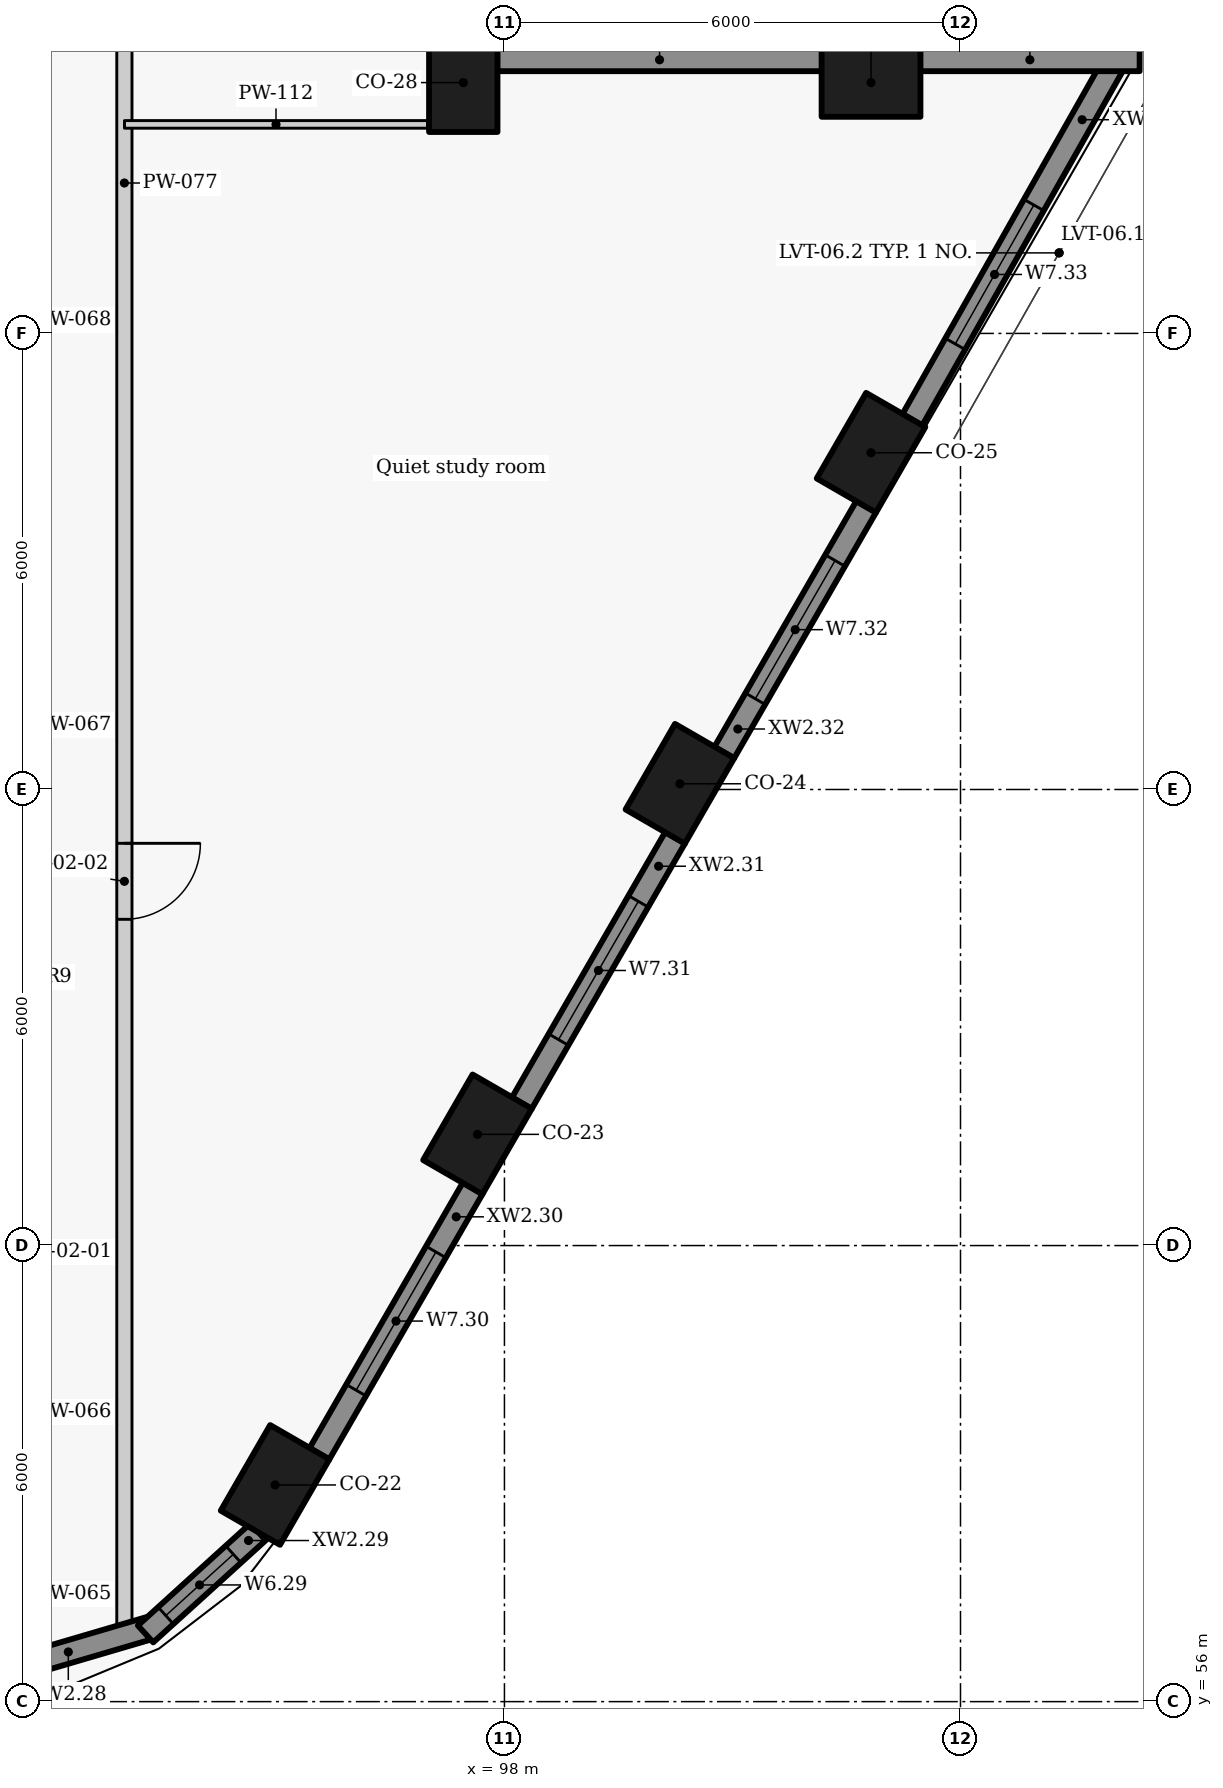
"""IFC4 building model, lengths in metres.
Left out: names, types, materials, properties, quantities, classifications, styles, units other than length and angle.
Written with IfcOpenShell. Run it as: python <this file> out.ifc"""

import sys

from ifc_helpers import new_model, si_unit, direction, frame, frame_2d, origin, origin_2d, place, context, subcontext, project, spatial, rectangle, extrude, element, fill, save


model = new_model("IFC4")
c1 = context("Model", 3, precision=1e-05, world=origin(), true_north=direction((0.0, 1.0)))
c2 = subcontext(c1, "Body", "Model", "MODEL_VIEW")
j1 = project(units=[si_unit("LENGTHUNIT", "METRE"), si_unit("PLANEANGLEUNIT", "RADIAN")], contexts=[c1])
p1 = place(None, origin())
s1 = spatial("IfcSite", under=j1, at=p1, CompositionType="ELEMENT")
p2 = place(p1, origin())
s2 = spatial("IfcBuilding", under=s1, at=p2, CompositionType="ELEMENT")
p3 = place(p2, frame((0.0, 0.0, 130.5)))
s3 = spatial("IfcBuildingStorey", under=s2, at=p3, CompositionType="ELEMENT", Elevation=130.5)
for number, where, z_axis, x_axis in (
    (1, (94.982, 58.851, 0.0), (0.0, 0.0, 1.0), (0.5, 0.866, 0.0)),
    (2, (97.646, 63.463, 0.0), (0.0, 0.0, 1.0), (0.5, 0.866, 0.0)),
    (3, (100.308, 68.075, 0.0), (0.0, 0.0, 1.0), (0.5, 0.866, 0.0)),
    (4, (102.823, 72.43, 0.0), (0.0, 0.0, 1.0), (0.5, 0.866, 0.0)),
    (5, (102.823, 77.3, 0.0), (0.0, 0.0, 1.0), (-1.0, 0.0, 0.0)),
    (6, (97.458, 77.3, 0.0), (0.0, 0.0, 1.0), (0.0, 1.0, 0.0)),
):
    element("IfcColumn", number, at=place(p3, frame(where, z_axis=z_axis, x_axis=x_axis)), inside=s3, PredefinedType="COLUMN", context=c2, shape_type="SweptSolid", body=[
        extrude(rectangle(XDim=1.3, YDim=0.9, at=origin_2d()), origin(), (0.0, 0.0, 1.0), 3.3),
    ])
p4 = place(p3, frame((91.153, 56.328, 0.0), z_axis=(0.0, 0.0, 1.0), x_axis=(0.959473072336, 0.281800325517, 0.0)))
e7 = element("IfcWall", 7, at=p4, inside=s3, PredefinedType="SOLIDWALL", context=c2, shape_type="SweptSolid", body=[
    extrude(rectangle(XDim=2.312, YDim=0.3, at=frame_2d((1.156, 0.0))), origin(), (0.0, 0.0, 1.0), 2.425),
])
p5 = place(p3, frame((93.278, 56.89, 0.0), z_axis=(0.0, 0.0, 1.0), x_axis=(0.740652597499, 0.671888182526, 0.0)))
e8 = element("IfcWall", 8, at=p5, inside=s3, PredefinedType="SOLIDWALL", context=c2, shape_type="SweptSolid", body=[
    extrude(rectangle(XDim=1.999, YDim=0.3, at=frame_2d((1.0, 0.0))), origin(), (0.0, 0.0, 1.0), 2.425),
])
p6 = place(p5, frame((0.36, 0.0, 0.9)))
e9 = element("IfcOpeningElement", 9, at=p6, cuts=e8, PredefinedType="OPENING", context=c2, shape_type="SweptSolid", body=[
    extrude(rectangle(XDim=1.2, YDim=1.1, at=frame_2d((0.6, 0.55))), frame((0.0, 0.16, 0.0), z_axis=(0.0, -1.0, 0.0), x_axis=(1.0, 0.0, 0.0)), (0.0, 0.0, 1.0), 0.32),
])
p7 = place(p3, frame((95.565, 59.26, 0.0), z_axis=(0.0, 0.0, 1.0), x_axis=(0.500031546601, 0.86600718958, 0.0)))
e10 = element("IfcWall", 10, at=p7, inside=s3, PredefinedType="SOLIDWALL", context=c2, shape_type="SweptSolid", body=[
    extrude(rectangle(XDim=4.034, YDim=0.3, at=frame_2d((2.017, 0.0))), origin(), (0.0, 0.0, 1.0), 2.425),
])
p8 = place(p7, frame((0.967, 0.0, 0.9)))
e11 = element("IfcOpeningElement", 11, at=p8, cuts=e10, PredefinedType="OPENING", context=c2, shape_type="SweptSolid", body=[
    extrude(rectangle(XDim=2.1, YDim=1.1, at=frame_2d((1.05, 0.55))), frame((0.0, 0.16, 0.0), z_axis=(0.0, -1.0, 0.0), x_axis=(1.0, 0.0, 0.0)), (0.0, 0.0, 1.0), 0.32),
])
p9 = place(p3, frame((98.228, 63.872, 0.0), z_axis=(0.0, 0.0, 1.0), x_axis=(0.500031546601, 0.86600718958, 0.0)))
e12 = element("IfcWall", 12, at=p9, inside=s3, PredefinedType="SOLIDWALL", context=c2, shape_type="SweptSolid", body=[
    extrude(rectangle(XDim=4.034, YDim=0.3, at=frame_2d((2.017, 0.0))), origin(), (0.0, 0.0, 1.0), 2.425),
])
p10 = place(p9, frame((0.967, 0.0, 0.9)))
e13 = element("IfcOpeningElement", 13, at=p10, cuts=e12, PredefinedType="OPENING", context=c2, shape_type="SweptSolid", body=[
    extrude(rectangle(XDim=2.1, YDim=1.1, at=frame_2d((1.05, 0.55))), frame((0.0, 0.16, 0.0), z_axis=(0.0, -1.0, 0.0), x_axis=(1.0, 0.0, 0.0)), (0.0, 0.0, 1.0), 0.32),
])
p11 = place(p3, frame((100.891, 68.485, 0.0), z_axis=(0.0, 0.0, 1.0), x_axis=(0.499933594891, 0.866063739398, 0.0)))
e14 = element("IfcWall", 14, at=p11, inside=s3, PredefinedType="SOLIDWALL", context=c2, shape_type="SweptSolid", body=[
    extrude(rectangle(XDim=3.737, YDim=0.3, at=frame_2d((1.868, 0.0))), origin(), (0.0, 0.0, 1.0), 2.425),
])
p12 = place(p11, frame((0.818, 0.0, 0.9)))
e15 = element("IfcOpeningElement", 15, at=p12, cuts=e14, PredefinedType="OPENING", context=c2, shape_type="SweptSolid", body=[
    extrude(rectangle(XDim=2.1, YDim=1.1, at=frame_2d((1.05, 0.55))), frame((0.0, 0.16, 0.0), z_axis=(0.0, -1.0, 0.0), x_axis=(1.0, 0.0, 0.0)), (0.0, 0.0, 1.0), 0.32),
])
p13 = place(p3, frame((103.366, 72.863, 0.0), z_axis=(0.0, 0.0, 1.0), x_axis=(0.492498306264, 0.87031340236, 0.0)))
e16 = element("IfcWall", 16, at=p13, inside=s3, PredefinedType="SOLIDWALL", context=c2, shape_type="SweptSolid", body=[
    extrude(rectangle(XDim=5.727, YDim=0.3, at=frame_2d((2.863, 0.0))), origin(), (0.0, 0.0, 1.0), 2.425),
])
p14 = place(p13, frame((1.148, 0.0, 0.9)))
e17 = element("IfcOpeningElement", 17, at=p14, cuts=e16, PredefinedType="OPENING", context=c2, shape_type="SweptSolid", body=[
    extrude(rectangle(XDim=2.1, YDim=1.1, at=frame_2d((1.05, 0.55))), frame((0.0, 0.16, 0.0), z_axis=(0.0, -1.0, 0.0), x_axis=(1.0, 0.0, 0.0)), (0.0, 0.0, 1.0), 0.32),
])
p15 = place(p3, frame((106.357, 77.6, 0.0), z_axis=(0.0, 0.0, 1.0), x_axis=(-1.0, 0.0, 0.0)))
e18 = element("IfcWall", 18, at=p15, inside=s3, PredefinedType="SOLIDWALL", context=c2, shape_type="SweptSolid", body=[
    extrude(rectangle(XDim=2.888, YDim=0.3, at=frame_2d((1.444, 0.0))), origin(), (0.0, 0.0, 1.0), 2.425),
])
p16 = place(p3, frame((102.177, 77.6, 0.0), z_axis=(0.0, 0.0, 1.0), x_axis=(-1.0, 0.0, 0.0)))
e19 = element("IfcWall", 19, at=p16, inside=s3, PredefinedType="SOLIDWALL", context=c2, shape_type="SweptSolid", body=[
    extrude(rectangle(XDim=4.273, YDim=0.3, at=frame_2d((2.136, 0.0))), origin(), (0.0, 0.0, 1.0), 2.425),
])
p17 = place(p3, frame((93.0, 102.498, 0.0), z_axis=(0.0, 0.0, 1.0), x_axis=(0.0, -1.0, 0.0)))
e20 = element("IfcWall", 20, at=p17, inside=s3, PredefinedType="PARTITIONING", context=c2, shape_type="SweptSolid", body=[
    extrude(rectangle(XDim=45.665, YDim=0.2, at=frame_2d((22.833, 0.0))), origin(), (0.0, 0.0, 1.0), 2.405),
])
p18 = place(p17, frame((35.206, 0.0, 0.0)))
e21 = element("IfcOpeningElement", 21, at=p18, cuts=e20, PredefinedType="OPENING", context=c2, shape_type="SweptSolid", body=[
    extrude(rectangle(XDim=1.0, YDim=2.1, at=frame_2d((0.5, 1.05))), frame((0.0, 0.11, 0.0), z_axis=(0.0, -1.0, 0.0), x_axis=(1.0, 0.0, 0.0)), (0.0, 0.0, 1.0), 0.22),
])
p19 = place(p17, frame((16.832, 0.0, 0.0)))
e22 = element("IfcOpeningElement", 22, at=p19, cuts=e20, PredefinedType="OPENING", context=c2, shape_type="SweptSolid", body=[
    extrude(rectangle(XDim=1.0, YDim=2.1, at=frame_2d((0.5, 1.05))), frame((0.0, 0.11, 0.0), z_axis=(0.0, -1.0, 0.0), x_axis=(1.0, 0.0, 0.0)), (0.0, 0.0, 1.0), 0.22),
])
p20 = place(p17, frame((3.959, 0.0, 0.0)))
e23 = element("IfcOpeningElement", 23, at=p20, cuts=e20, PredefinedType="OPENING", context=c2, shape_type="SweptSolid", body=[
    extrude(rectangle(XDim=1.0, YDim=2.1, at=frame_2d((0.5, 1.05))), frame((0.0, 0.11, 0.0), z_axis=(0.0, -1.0, 0.0), x_axis=(1.0, 0.0, 0.0)), (0.0, 0.0, 1.0), 0.22),
])
p21 = place(p3, frame((93.001, 76.75, 0.0), z_axis=(0.0, 0.0, 1.0), x_axis=(1.0, 0.0, 0.0)))
e24 = element("IfcWall", 24, at=p21, inside=s3, PredefinedType="PARTITIONING", context=c2, shape_type="SweptSolid", body=[
    extrude(rectangle(XDim=3.987, YDim=0.1, at=frame_2d((1.994, 0.0))), origin(), (0.0, 0.0, 1.0), 3.025),
])
p22 = place(p6, origin())
e25 = element("IfcWindow", 25, at=p22, inside=s3, PartitioningType="SINGLE_PANEL", PredefinedType="WINDOW", context=c2, shape_type="SweptSolid", body=[
    extrude(rectangle(XDim=1.2, YDim=1.1, at=frame_2d((0.6, 0.55))), frame((0.0, 0.03, 0.0), z_axis=(0.0, -1.0, 0.0), x_axis=(1.0, 0.0, 0.0)), (0.0, 0.0, 1.0), 0.06),
])
fill(e9, e25)
p23 = place(p8, origin())
e26 = element("IfcWindow", 26, at=p23, inside=s3, PartitioningType="SINGLE_PANEL", PredefinedType="WINDOW", context=c2, shape_type="SweptSolid", body=[
    extrude(rectangle(XDim=2.1, YDim=1.1, at=frame_2d((1.05, 0.55))), frame((0.0, 0.03, 0.0), z_axis=(0.0, -1.0, 0.0), x_axis=(1.0, 0.0, 0.0)), (0.0, 0.0, 1.0), 0.06),
])
fill(e11, e26)
p24 = place(p10, origin())
e27 = element("IfcWindow", 27, at=p24, inside=s3, PartitioningType="SINGLE_PANEL", PredefinedType="WINDOW", context=c2, shape_type="SweptSolid", body=[
    extrude(rectangle(XDim=2.1, YDim=1.1, at=frame_2d((1.05, 0.55))), frame((0.0, 0.03, 0.0), z_axis=(0.0, -1.0, 0.0), x_axis=(1.0, 0.0, 0.0)), (0.0, 0.0, 1.0), 0.06),
])
fill(e13, e27)
p25 = place(p12, origin())
e28 = element("IfcWindow", 28, at=p25, inside=s3, PartitioningType="SINGLE_PANEL", PredefinedType="WINDOW", context=c2, shape_type="SweptSolid", body=[
    extrude(rectangle(XDim=2.1, YDim=1.1, at=frame_2d((1.05, 0.55))), frame((0.0, 0.03, 0.0), z_axis=(0.0, -1.0, 0.0), x_axis=(1.0, 0.0, 0.0)), (0.0, 0.0, 1.0), 0.06),
])
fill(e15, e28)
p26 = place(p14, origin())
e29 = element("IfcWindow", 29, at=p26, inside=s3, PartitioningType="SINGLE_PANEL", PredefinedType="WINDOW", context=c2, shape_type="SweptSolid", body=[
    extrude(rectangle(XDim=2.1, YDim=1.1, at=frame_2d((1.05, 0.55))), frame((0.0, 0.03, 0.0), z_axis=(0.0, -1.0, 0.0), x_axis=(1.0, 0.0, 0.0)), (0.0, 0.0, 1.0), 0.06),
])
fill(e17, e29)
p27 = place(p18, origin())
e30 = element("IfcDoor", 30, at=p27, inside=s3, OperationType="SINGLE_SWING_LEFT", PredefinedType="DOOR", context=c2, shape_type="SweptSolid", body=[
    extrude(rectangle(XDim=1.0, YDim=2.1, at=frame_2d((0.5, 1.05))), frame((0.0, 0.025, 0.0), z_axis=(0.0, -1.0, 0.0), x_axis=(1.0, 0.0, 0.0)), (0.0, 0.0, 1.0), 0.05),
])
fill(e21, e30)
save(model, sys.argv[1])
